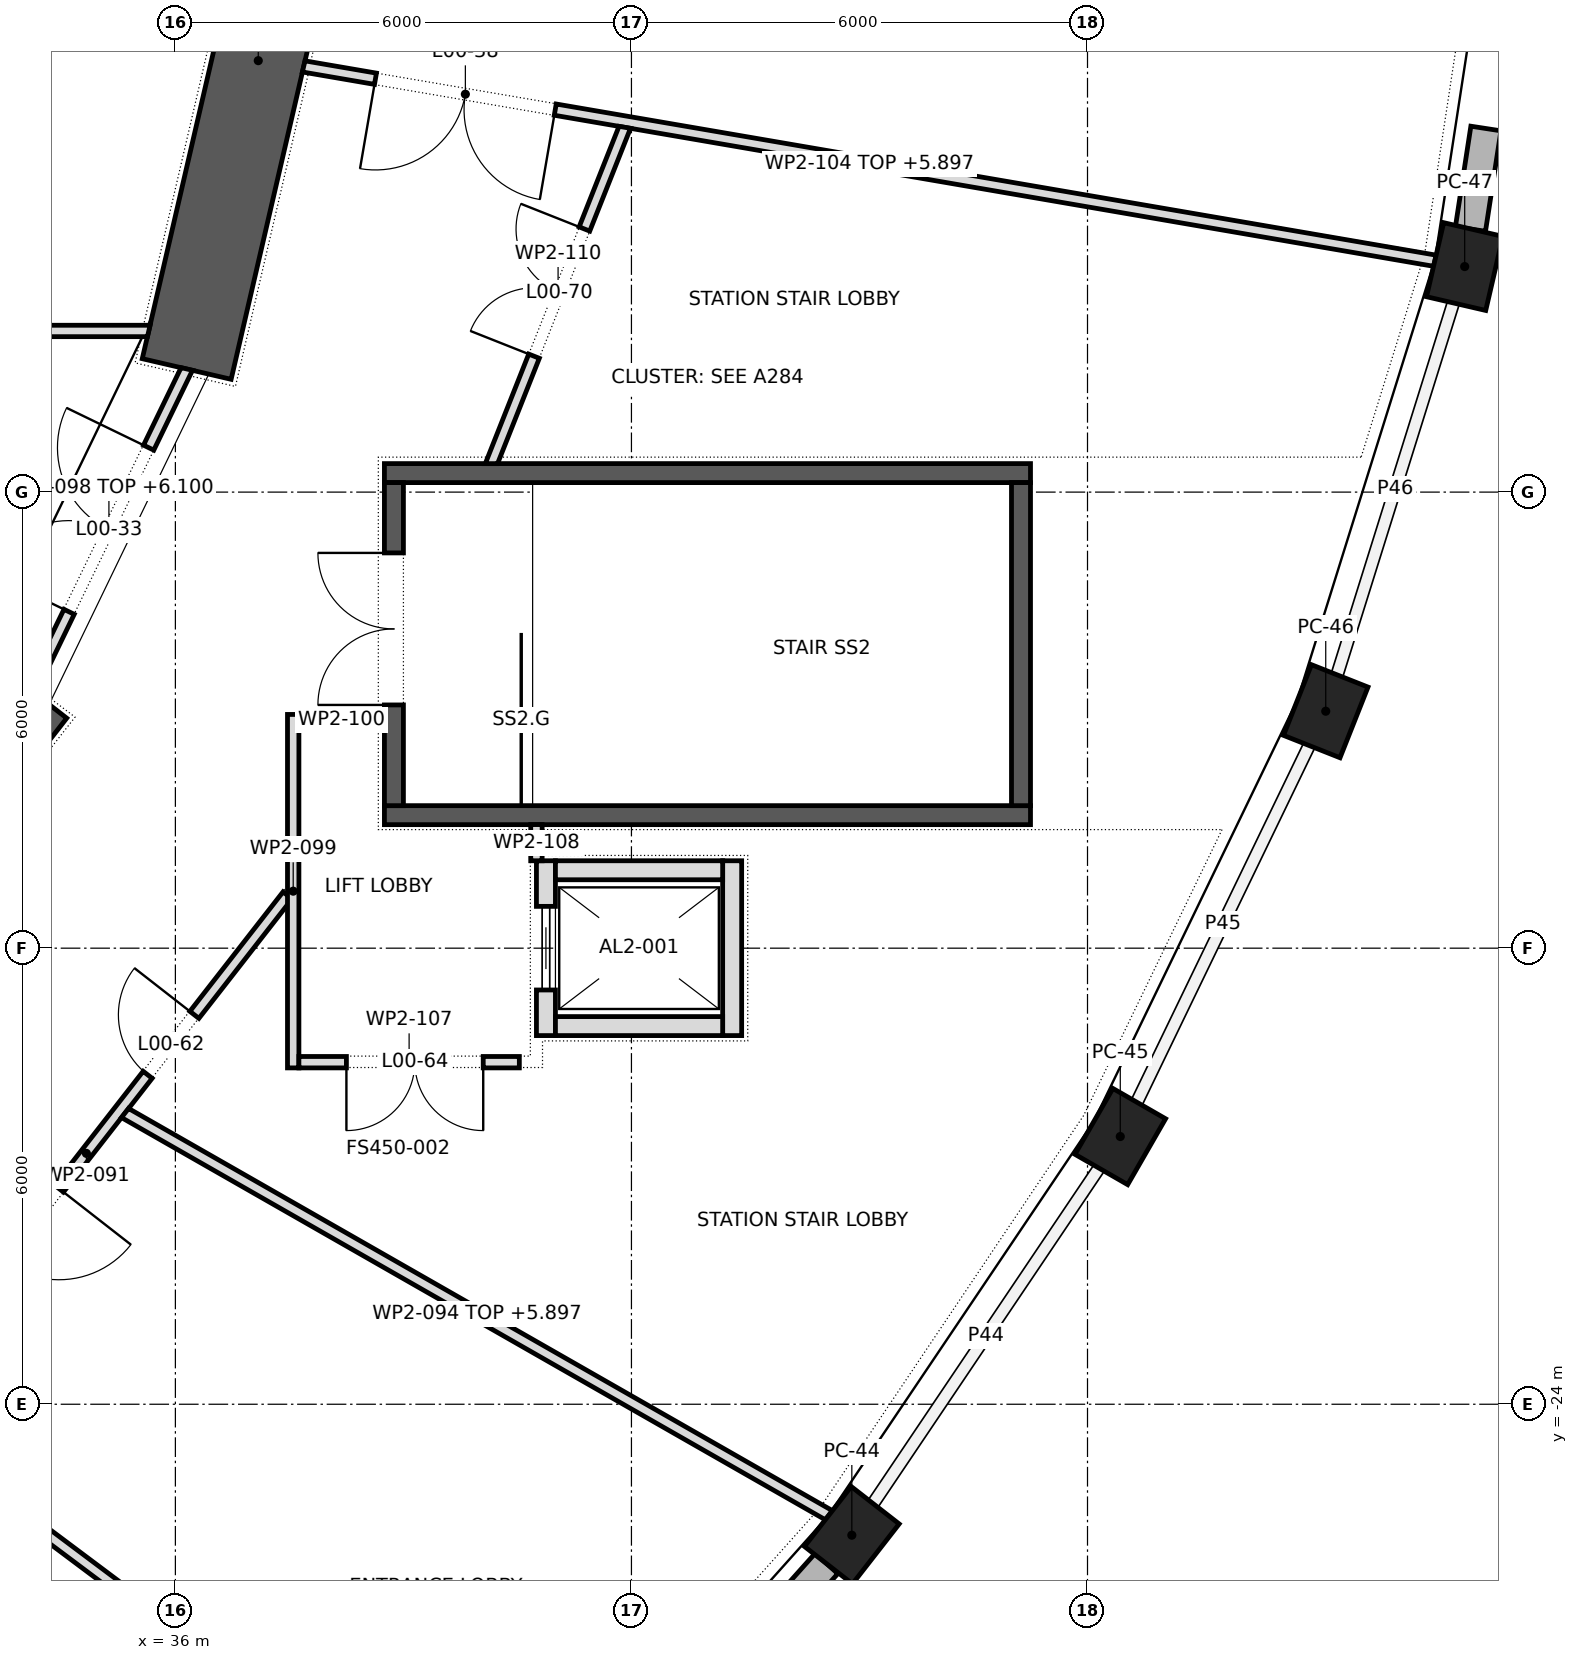
"""IFC4 building model, lengths in metres.
Left out: names, types, materials, properties, quantities, classifications, styles, units other than length and angle.
Written with IfcOpenShell. Run it as: python <this file> out.ifc"""

import sys

from ifc_helpers import new_model, si_unit, direction, frame, frame_2d, origin, origin_2d, place, context, subcontext, project, spatial, polyline, rectangle, outline, extrude, element, fill, save


model = new_model("IFC4")
c1 = context("Model", 3, precision=1e-05, world=origin(), true_north=direction((0.0, 1.0)))
c2 = subcontext(c1, "Body", "Model", "MODEL_VIEW")
j1 = project(units=[si_unit("LENGTHUNIT", "METRE"), si_unit("PLANEANGLEUNIT", "RADIAN")], contexts=[c1])
p1 = place(None, origin())
s1 = spatial("IfcSite", under=j1, at=p1, CompositionType="ELEMENT")
p2 = place(p1, origin())
s2 = spatial("IfcBuilding", under=s1, at=p2, CompositionType="ELEMENT")
p3 = place(p2, origin())
s3 = spatial("IfcBuildingStorey", under=s2, at=p3, CompositionType="ELEMENT", Elevation=0.0)
for number, where, z_axis, x_axis in (
    (1, (44.899, -25.723, 0.0), (0.0, 0.0, 1.0), (0.615, 0.789, 0.0)),
    (2, (48.431, -20.478, 0.0), (0.0, 0.0, 1.0), (0.499, 0.867, 0.0)),
    (3, (51.134, -14.883, 0.0), (0.0, 0.0, 1.0), (0.368, 0.93, 0.0)),
    (4, (52.962, -9.033, 0.0), (0.0, 0.0, 1.0), (0.226, 0.974, 0.0)),
):
    element("IfcColumn", number, at=place(p3, frame(where, z_axis=z_axis, x_axis=x_axis)), inside=s3, PredefinedType="COLUMN", context=c2, shape_type="SweptSolid", body=[
        extrude(rectangle(XDim=1.0, YDim=0.8, at=origin_2d()), origin(), (0.0, 0.0, 1.0), 7.0),
    ])
p4 = place(p3, frame((28.79, -21.412, 0.0), z_axis=(0.0, 0.0, 1.0), x_axis=(0.614825322247, 0.788663314174, 0.0)))
e5 = element("IfcWall", 5, at=p4, inside=s3, PredefinedType="SHEAR", context=c2, shape_type="SweptSolid", body=[
    extrude(rectangle(XDim=8.632, YDim=1.2, at=frame_2d((4.316, 0.0))), origin(), (0.0, 0.0, 1.0), 7.0),
])
p5 = place(p3, frame((36.149, -10.38, 0.0), z_axis=(0.0, 0.0, 1.0), x_axis=(0.226058185805, 0.974113800657, 0.0)))
e6 = element("IfcWall", 6, at=p5, inside=s3, PredefinedType="SHEAR", context=c2, shape_type="SweptSolid", body=[
    extrude(rectangle(XDim=8.329, YDim=1.2, at=frame_2d((4.165, 0.0))), origin(), (0.0, 0.0, 1.0), 7.0),
])
p6 = place(p3, frame((40.933, -30.155, 0.0), z_axis=(0.0, 0.0, 1.0), x_axis=(0.666902265084, 0.745145199827, 0.0)))
e7 = element("IfcWall", 7, at=p6, inside=s3, PredefinedType="STANDARD", context=c2, shape_type="SweptSolid", body=[
    extrude(rectangle(XDim=5.448, YDim=0.4, at=frame_2d((2.724, 0.0))), origin(), (0.0, 0.0, 1.0), 6.2),
])
p7 = place(p6, frame((1.224, 0.0, 0.0)))
e8 = element("IfcOpeningElement", 8, at=p7, cuts=e7, PredefinedType="OPENING", context=c2, shape_type="SweptSolid", body=[
    extrude(rectangle(XDim=3.0, YDim=3.0, at=frame_2d((1.5, 1.5))), frame((0.0, 0.212, 0.0), z_axis=(0.0, -1.0, 0.0), x_axis=(1.0, 0.0, 0.0)), (0.0, 0.0, 1.0), 0.424),
])
p8 = place(p6, frame((1.224, 0.0, 3.45)))
e9 = element("IfcOpeningElement", 9, at=p8, cuts=e7, PredefinedType="OPENING", context=c2, shape_type="SweptSolid", body=[
    extrude(rectangle(XDim=3.0, YDim=2.25, at=frame_2d((1.5, 1.125))), frame((0.0, 0.212, 0.0), z_axis=(0.0, -1.0, 0.0), x_axis=(1.0, 0.0, 0.0)), (0.0, 0.0, 1.0), 0.424),
])
p9 = place(p3, frame((53.038, -8.539, 0.0), z_axis=(0.0, 0.0, 1.0), x_axis=(0.151778822734, 0.988414482375, 0.0)))
e10 = element("IfcWall", 10, at=p9, inside=s3, PredefinedType="STANDARD", context=c2, shape_type="SweptSolid", body=[
    extrude(rectangle(XDim=5.075, YDim=0.4, at=frame_2d((2.538, 0.0))), origin(), (0.0, 0.0, 1.0), 6.2),
])
p10 = place(p9, frame((1.337, 0.0, 0.0)))
e11 = element("IfcOpeningElement", 11, at=p10, cuts=e10, PredefinedType="OPENING", context=c2, shape_type="SweptSolid", body=[
    extrude(rectangle(XDim=2.4, YDim=2.4, at=frame_2d((1.2, 1.2))), frame((0.0, 0.212, 0.0), z_axis=(0.0, -1.0, 0.0), x_axis=(1.0, 0.0, 0.0)), (0.0, 0.0, 1.0), 0.424),
])
for number, where, z_axis, x_axis in (
    (12, (38.75, -11.75, 0.0), (0.0, 0.0, 1.0), (1.0, 0.0, 0.0)),
    (13, (38.75, -16.25, 0.0), (0.0, 0.0, 1.0), (1.0, 0.0, 0.0)),
):
    element("IfcWall", number, at=place(p3, frame(where, z_axis=z_axis, x_axis=x_axis)), inside=s3, PredefinedType="SHEAR", context=c2, shape_type="SweptSolid", body=[
        extrude(rectangle(XDim=8.5, YDim=0.25, at=frame_2d((4.25, 0.0))), origin(), (0.0, 0.0, 1.0), 6.65),
    ])
p11 = place(p3, frame((38.875, -16.125, 0.0), z_axis=(0.0, 0.0, 1.0), x_axis=(0.0, 1.0, 0.0)))
e14 = element("IfcWall", 14, at=p11, inside=s3, PredefinedType="SHEAR", context=c2, shape_type="SweptSolid", body=[
    extrude(rectangle(XDim=4.25, YDim=0.25, at=frame_2d((2.125, 0.0))), origin(), (0.0, 0.0, 1.0), 6.65),
])
p12 = place(p11, frame((1.325, 0.0, 0.0)))
e15 = element("IfcOpeningElement", 15, at=p12, cuts=e14, PredefinedType="OPENING", context=c2, shape_type="SweptSolid", body=[
    extrude(rectangle(XDim=2.0, YDim=2.1, at=frame_2d((1.0, 1.05))), frame((0.0, 0.137, 0.0), z_axis=(0.0, -1.0, 0.0), x_axis=(1.0, 0.0, 0.0)), (0.0, 0.0, 1.0), 0.274),
])
p13 = place(p3, frame((47.125, -16.125, 0.0), z_axis=(0.0, 0.0, 1.0), x_axis=(0.0, 1.0, 0.0)))
e16 = element("IfcWall", 16, at=p13, inside=s3, PredefinedType="SHEAR", context=c2, shape_type="SweptSolid", body=[
    extrude(rectangle(XDim=4.25, YDim=0.25, at=frame_2d((2.125, 0.0))), origin(), (0.0, 0.0, 1.0), 6.65),
])
p14 = place(p3, frame((40.875, -19.15, 0.0), z_axis=(0.0, 0.0, 1.0), x_axis=(0.0, 1.0, 0.0)))
e17 = element("IfcWall", 17, at=p14, inside=s3, PredefinedType="PARTITIONING", context=c2, shape_type="SweptSolid", body=[
    extrude(rectangle(XDim=2.3, YDim=0.25, at=frame_2d((1.15, 0.0))), origin(), (0.0, 0.0, 1.0), 6.65),
])
p15 = place(p14, frame((0.6, 0.0, 0.0)))
e18 = element("IfcOpeningElement", 18, at=p15, cuts=e17, PredefinedType="OPENING", context=c2, shape_type="SweptSolid", body=[
    extrude(rectangle(XDim=1.1, YDim=2.1, at=frame_2d((0.55, 1.05))), frame((0.0, 0.137, 0.0), z_axis=(0.0, -1.0, 0.0), x_axis=(1.0, 0.0, 0.0)), (0.0, 0.0, 1.0), 0.274),
])
p16 = place(p3, frame((43.325, -19.15, 0.0), z_axis=(0.0, 0.0, 1.0), x_axis=(0.0, 1.0, 0.0)))
e19 = element("IfcWall", 19, at=p16, inside=s3, PredefinedType="PARTITIONING", context=c2, shape_type="SweptSolid", body=[
    extrude(rectangle(XDim=2.3, YDim=0.25, at=frame_2d((1.15, 0.0))), origin(), (0.0, 0.0, 1.0), 6.65),
])
for number, where, z_axis, x_axis in (
    (20, (41.0, -16.975, 0.0), (0.0, 0.0, 1.0), (1.0, 0.0, 0.0)),
    (21, (41.0, -19.025, 0.0), (0.0, 0.0, 1.0), (1.0, 0.0, 0.0)),
):
    element("IfcWall", number, at=place(p3, frame(where, z_axis=z_axis, x_axis=x_axis)), inside=s3, PredefinedType="PARTITIONING", context=c2, shape_type="SweptSolid", body=[
        extrude(rectangle(XDim=2.2, YDim=0.25, at=frame_2d((1.1, 0.0))), origin(), (0.0, 0.0, 1.0), 6.65),
    ])
p17 = place(p3, frame((32.183, -24.094, 0.0), z_axis=(0.0, 0.0, 1.0), x_axis=(0.614892482098, 0.78861095317, 0.0)))
e22 = element("IfcWall", 22, at=p17, inside=s3, PredefinedType="PARTITIONING", context=c2, shape_type="SweptSolid", body=[
    extrude(rectangle(XDim=8.608, YDim=0.15, at=frame_2d((4.304, 0.0))), origin(), (0.0, 0.0, 1.0), 6.65),
])
p18 = place(p17, frame((1.317, 0.0, 0.0)))
e23 = element("IfcOpeningElement", 23, at=p18, cuts=e22, PredefinedType="OPENING", context=c2, shape_type="SweptSolid", body=[
    extrude(rectangle(XDim=2.4, YDim=2.1, at=frame_2d((1.2, 1.05))), frame((0.0, 0.087, 0.0), z_axis=(0.0, -1.0, 0.0), x_axis=(1.0, 0.0, 0.0)), (0.0, 0.0, 1.0), 0.174),
])
p19 = place(p17, frame((5.615, 0.0, 0.0)))
e24 = element("IfcOpeningElement", 24, at=p19, cuts=e22, PredefinedType="OPENING", context=c2, shape_type="SweptSolid", body=[
    extrude(rectangle(XDim=1.0, YDim=2.1, at=frame_2d((0.5, 1.05))), frame((0.0, 0.087, 0.0), z_axis=(0.0, -1.0, 0.0), x_axis=(1.0, 0.0, 0.0)), (0.0, 0.0, 1.0), 0.174),
])
p20 = place(p3, frame((32.227, -24.153, 0.0), z_axis=(0.0, 0.0, 1.0), x_axis=(0.800465305701, -0.599379090701, 0.0)))
e25 = element("IfcWall", 25, at=p20, inside=s3, PredefinedType="PARTITIONING", context=c2, shape_type="SweptSolid", body=[
    extrude(outline(polyline([(0.0, -0.075), (10.12, -0.075), (10.144, 0.075), (0.0, 0.075), (0.0, -0.075)])), origin(), (0.0, 0.0, 1.0), 6.05),
])
p21 = place(p3, frame((35.337, -20.168, 0.0), z_axis=(0.0, 0.0, 1.0), x_axis=(0.868241733504, -0.496141403435, 0.0)))
e26 = element("IfcWall", 26, at=p21, inside=s3, PredefinedType="PARTITIONING", context=c2, shape_type="SweptSolid", body=[
    extrude(outline(polyline([(-0.011, -0.075), (10.655, -0.075), (10.677, 0.075), (0.011, 0.075), (-0.011, -0.075)])), origin(), (0.0, 0.0, 1.0), 5.897),
])
p22 = place(p3, frame((35.65, -9.88, 0.0), z_axis=(0.0, 0.0, 1.0), x_axis=(-1.0, 0.0, 0.0)))
e27 = element("IfcWall", 27, at=p22, inside=s3, PredefinedType="PARTITIONING", context=c2, shape_type="SweptSolid", body=[
    extrude(outline(polyline([(-0.017, -0.075), (16.65, -0.075), (16.65, 0.075), (0.017, 0.075), (-0.017, -0.075)])), origin(), (0.0, 0.0, 1.0), 6.65),
])
p23 = place(p22, frame((7.445, 0.0, 0.0)))
e28 = element("IfcOpeningElement", 28, at=p23, cuts=e27, PredefinedType="OPENING", context=c2, shape_type="SweptSolid", body=[
    extrude(rectangle(XDim=1.8, YDim=2.1, at=frame_2d((0.9, 1.05))), frame((0.0, 0.087, 0.0), z_axis=(0.0, -1.0, 0.0), x_axis=(1.0, 0.0, 0.0)), (0.0, 0.0, 1.0), 0.174),
])
p24 = place(p3, frame((36.15, -10.38, 0.0), z_axis=(0.0, 0.0, 1.0), x_axis=(-0.436102687495, -0.899896908518, 0.0)))
e29 = element("IfcWall", 29, at=p24, inside=s3, PredefinedType="PARTITIONING", context=c2, shape_type="SweptSolid", body=[
    extrude(outline(polyline([(0.017, -0.075), (4.683, -0.075), (4.715, 0.075), (-0.017, 0.075), (0.017, -0.075)])), origin(), (0.0, 0.0, 1.0), 6.1),
])
p25 = place(p24, frame((1.15, 0.0, 0.0)))
e30 = element("IfcOpeningElement", 30, at=p25, cuts=e29, PredefinedType="OPENING", context=c2, shape_type="SweptSolid", body=[
    extrude(rectangle(XDim=2.4, YDim=2.1, at=frame_2d((1.2, 1.05))), frame((0.0, 0.087, 0.0), z_axis=(0.0, -1.0, 0.0), x_axis=(1.0, 0.0, 0.0)), (0.0, 0.0, 1.0), 0.174),
])
p26 = place(p3, frame((37.55, -19.575, 0.0), z_axis=(0.0, 0.0, 1.0), x_axis=(0.0, 1.0, 0.0)))
e31 = element("IfcWall", 31, at=p26, inside=s3, PredefinedType="PARTITIONING", context=c2, shape_type="SweptSolid", body=[
    extrude(rectangle(XDim=4.65, YDim=0.15, at=frame_2d((2.325, 0.0))), origin(), (0.0, 0.0, 1.0), 6.65),
])
p27 = place(p3, frame((37.625, -15.0, 0.0), z_axis=(0.0, 0.0, 1.0), x_axis=(1.0, 0.0, 0.0)))
e32 = element("IfcWall", 32, at=p27, inside=s3, PredefinedType="PARTITIONING", context=c2, shape_type="SweptSolid", body=[
    extrude(rectangle(XDim=1.126, YDim=0.15, at=frame_2d((0.563, 0.0))), origin(), (0.0, 0.0, 1.0), 6.65),
])
p28 = place(p3, frame((37.688, -6.4, 0.0), z_axis=(0.0, 0.0, 1.0), x_axis=(0.985568200056, -0.169278832222, 0.0)))
e33 = element("IfcWall", 33, at=p28, inside=s3, PredefinedType="PARTITIONING", context=c2, shape_type="SweptSolid", body=[
    extrude(outline(polyline([(-0.004, -0.075), (15.096, -0.075), (15.105, 0.075), (0.004, 0.075), (-0.004, -0.075)])), origin(), (0.0, 0.0, 1.0), 5.897),
])
p29 = place(p28, frame((0.958, 0.0, 0.0)))
e34 = element("IfcOpeningElement", 34, at=p29, cuts=e33, PredefinedType="OPENING", context=c2, shape_type="SweptSolid", body=[
    extrude(rectangle(XDim=2.4, YDim=2.1, at=frame_2d((1.2, 1.05))), frame((0.0, 0.087, 0.0), z_axis=(0.0, -1.0, 0.0), x_axis=(1.0, 0.0, 0.0)), (0.0, 0.0, 1.0), 0.174),
])
p30 = place(p3, frame((40.525, -19.5, 0.0), z_axis=(0.0, 0.0, 1.0), x_axis=(-1.0, 0.0, 0.0)))
e35 = element("IfcWall", 35, at=p30, inside=s3, PredefinedType="PARTITIONING", context=c2, shape_type="SweptSolid", body=[
    extrude(rectangle(XDim=2.9, YDim=0.15, at=frame_2d((1.45, 0.0))), origin(), (0.0, 0.0, 1.0), 6.65),
])
p31 = place(p30, frame((0.475, 0.0, 0.0)))
e36 = element("IfcOpeningElement", 36, at=p31, cuts=e35, PredefinedType="OPENING", context=c2, shape_type="SweptSolid", body=[
    extrude(rectangle(XDim=1.8, YDim=2.1, at=frame_2d((0.9, 1.05))), frame((0.0, 0.087, 0.0), z_axis=(0.0, -1.0, 0.0), x_axis=(1.0, 0.0, 0.0)), (0.0, 0.0, 1.0), 0.174),
])
p32 = place(p3, frame((40.75, -16.374, 0.0), z_axis=(0.0, 0.0, 1.0), x_axis=(0.0, -1.0, 0.0)))
e37 = element("IfcWall", 37, at=p32, inside=s3, PredefinedType="PARTITIONING", context=c2, shape_type="SweptSolid", body=[
    extrude(rectangle(XDim=0.476, YDim=0.15, at=frame_2d((0.238, 0.0))), origin(), (0.0, 0.0, 1.0), 6.65),
])
p33 = place(p3, frame((41.912, -7.201, 0.0), z_axis=(0.0, 0.0, 1.0), x_axis=(-0.368576813523, -0.929597295894, 0.0)))
e38 = element("IfcWall", 38, at=p33, inside=s3, PredefinedType="PARTITIONING", context=c2, shape_type="SweptSolid", body=[
    extrude(outline(polyline([(0.016, -0.075), (4.79, -0.075), (4.73, 0.075), (-0.016, 0.075), (0.016, -0.075)])), origin(), (0.0, 0.0, 1.0), 6.65),
])
p34 = place(p33, frame((1.439, 0.0, 0.0)))
e39 = element("IfcOpeningElement", 39, at=p34, cuts=e38, PredefinedType="OPENING", context=c2, shape_type="SweptSolid", body=[
    extrude(rectangle(XDim=1.8, YDim=2.1, at=frame_2d((0.9, 1.05))), frame((0.0, 0.087, 0.0), z_axis=(0.0, -1.0, 0.0), x_axis=(1.0, 0.0, 0.0)), (0.0, 0.0, 1.0), 0.174),
])
p35 = place(p10, frame((2.4, 0.0, 0.0), z_axis=(0.0, 0.0, 1.0), x_axis=(-1.0, 0.0, 0.0)))
e40 = element("IfcDoor", 40, at=p35, inside=s3, OperationType="DOUBLE_DOOR_SINGLE_SWING", PredefinedType="DOOR", context=c2, shape_type="SweptSolid", body=[
    extrude(rectangle(XDim=2.4, YDim=2.4, at=frame_2d((1.2, 1.2))), frame((0.0, 0.025, 0.0), z_axis=(0.0, -1.0, 0.0), x_axis=(1.0, 0.0, 0.0)), (0.0, 0.0, 1.0), 0.05),
])
fill(e11, e40)
p36 = place(p15, origin())
e41 = element("IfcDoor", 41, at=p36, inside=s3, OperationType="SLIDING_TO_LEFT", PredefinedType="DOOR", context=c2, shape_type="SweptSolid", body=[
    extrude(rectangle(XDim=1.1, YDim=2.1, at=frame_2d((0.55, 1.05))), frame((0.0, 0.025, 0.0), z_axis=(0.0, -1.0, 0.0), x_axis=(1.0, 0.0, 0.0)), (0.0, 0.0, 1.0), 0.05),
])
fill(e18, e41)
p37 = place(p12, origin())
e42 = element("IfcDoor", 42, at=p37, inside=s3, OperationType="DOUBLE_DOOR_SINGLE_SWING", PredefinedType="DOOR", context=c2, shape_type="SweptSolid", body=[
    extrude(rectangle(XDim=2.0, YDim=2.1, at=frame_2d((1.0, 1.05))), frame((0.0, 0.025, 0.0), z_axis=(0.0, -1.0, 0.0), x_axis=(1.0, 0.0, 0.0)), (0.0, 0.0, 1.0), 0.05),
])
fill(e15, e42)
p38 = place(p25, frame((2.4, 0.0, 0.0), z_axis=(0.0, 0.0, 1.0), x_axis=(-1.0, 0.0, 0.0)))
e43 = element("IfcDoor", 43, at=p38, inside=s3, OperationType="DOUBLE_DOOR_SINGLE_SWING", PredefinedType="DOOR", context=c2, shape_type="SweptSolid", body=[
    extrude(rectangle(XDim=2.4, YDim=2.1, at=frame_2d((1.2, 1.05))), frame((0.0, 0.025, 0.0), z_axis=(0.0, -1.0, 0.0), x_axis=(1.0, 0.0, 0.0)), (0.0, 0.0, 1.0), 0.05),
])
fill(e30, e43)
p39 = place(p29, frame((2.4, 0.0, 0.0), z_axis=(0.0, 0.0, 1.0), x_axis=(-1.0, 0.0, 0.0)))
e44 = element("IfcDoor", 44, at=p39, inside=s3, OperationType="DOUBLE_DOOR_SINGLE_SWING", PredefinedType="DOOR", context=c2, shape_type="SweptSolid", body=[
    extrude(rectangle(XDim=2.4, YDim=2.1, at=frame_2d((1.2, 1.05))), frame((0.0, 0.025, 0.0), z_axis=(0.0, -1.0, 0.0), x_axis=(1.0, 0.0, 0.0)), (0.0, 0.0, 1.0), 0.05),
])
fill(e34, e44)
p40 = place(p18, frame((2.4, 0.0, 0.0), z_axis=(0.0, 0.0, 1.0), x_axis=(-1.0, 0.0, 0.0)))
e45 = element("IfcDoor", 45, at=p40, inside=s3, OperationType="DOUBLE_DOOR_SINGLE_SWING", PredefinedType="DOOR", context=c2, shape_type="SweptSolid", body=[
    extrude(rectangle(XDim=2.4, YDim=2.1, at=frame_2d((1.2, 1.05))), frame((0.0, 0.025, 0.0), z_axis=(0.0, -1.0, 0.0), x_axis=(1.0, 0.0, 0.0)), (0.0, 0.0, 1.0), 0.05),
])
fill(e23, e45)
p41 = place(p19, origin())
e46 = element("IfcDoor", 46, at=p41, inside=s3, OperationType="SINGLE_SWING_LEFT", PredefinedType="DOOR", context=c2, shape_type="SweptSolid", body=[
    extrude(rectangle(XDim=1.0, YDim=2.1, at=frame_2d((0.5, 1.05))), frame((0.0, 0.025, 0.0), z_axis=(0.0, -1.0, 0.0), x_axis=(1.0, 0.0, 0.0)), (0.0, 0.0, 1.0), 0.05),
])
fill(e24, e46)
p42 = place(p31, origin())
e47 = element("IfcDoor", 47, at=p42, inside=s3, OperationType="DOUBLE_DOOR_SINGLE_SWING", PredefinedType="DOOR", context=c2, shape_type="SweptSolid", body=[
    extrude(rectangle(XDim=1.8, YDim=2.1, at=frame_2d((0.9, 1.05))), frame((0.0, 0.025, 0.0), z_axis=(0.0, -1.0, 0.0), x_axis=(1.0, 0.0, 0.0)), (0.0, 0.0, 1.0), 0.05),
])
fill(e36, e47)
p43 = place(p34, frame((1.8, 0.0, 0.0), z_axis=(0.0, 0.0, 1.0), x_axis=(-1.0, 0.0, 0.0)))
e48 = element("IfcDoor", 48, at=p43, inside=s3, OperationType="DOUBLE_DOOR_SINGLE_SWING", PredefinedType="DOOR", context=c2, shape_type="SweptSolid", body=[
    extrude(rectangle(XDim=1.8, YDim=2.1, at=frame_2d((0.9, 1.05))), frame((0.0, 0.025, 0.0), z_axis=(0.0, -1.0, 0.0), x_axis=(1.0, 0.0, 0.0)), (0.0, 0.0, 1.0), 0.05),
])
fill(e39, e48)
save(model, sys.argv[1])
